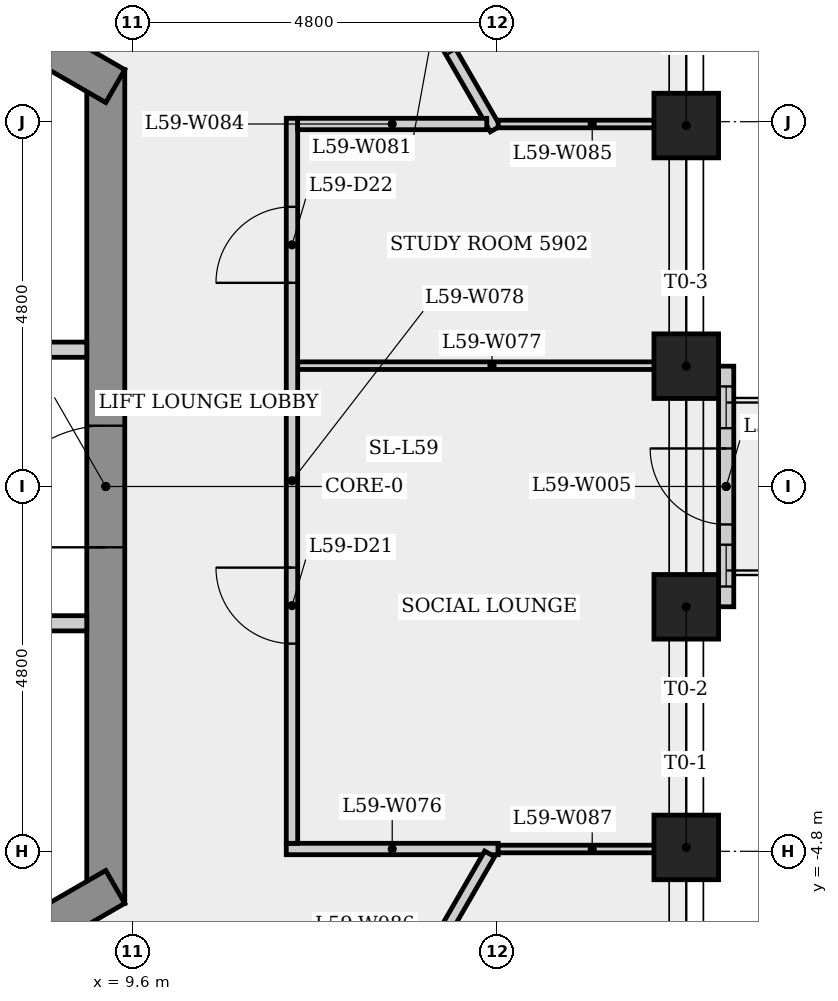
"""IFC4 building model, lengths in metres.
Left out: names, types, materials, properties, quantities, classifications, styles, units other than length and angle.
Written with IfcOpenShell. Run it as: python <this file> out.ifc"""

import sys

from ifc_helpers import new_model, si_unit, direction, frame, frame_2d, origin, origin_2d, place, context, subcontext, project, spatial, rectangle, extrude, element, fill, save


model = new_model("IFC4")
c1 = context("Model", 3, precision=1e-05, world=origin(), true_north=direction((0.0, 1.0)))
c2 = subcontext(c1, "Body", "Model", "MODEL_VIEW")
j1 = project(units=[si_unit("LENGTHUNIT", "METRE"), si_unit("PLANEANGLEUNIT", "RADIAN")], contexts=[c1])
p1 = place(None, origin())
s1 = spatial("IfcSite", under=j1, at=p1, CompositionType="ELEMENT")
p2 = place(p1, origin())
s2 = spatial("IfcBuilding", under=s1, at=p2, CompositionType="ELEMENT")
p3 = place(p2, frame((0.0, 0.0, 222.3)))
s3 = spatial("IfcBuildingStorey", under=s2, at=p3, CompositionType="ELEMENT", Elevation=222.3)
p4 = place(p3, frame((9.25, -5.485, 0.0), z_axis=(0.0, 0.0, 1.0), x_axis=(0.0, 1.0, 0.0)))
e1 = element("IfcWall", 1, at=p4, inside=s3, PredefinedType="SHEAR", context=c2, shape_type="SweptSolid", body=[
    extrude(rectangle(XDim=10.97, YDim=0.5, at=frame_2d((5.485, 0.0))), origin(), (0.0, 0.0, 1.0), 3.4),
])
p5 = place(p4, frame((4.685, 0.0, 0.0)))
e2 = element("IfcOpeningElement", 2, at=p5, cuts=e1, PredefinedType="OPENING", context=c2, shape_type="SweptSolid", body=[
    extrude(rectangle(XDim=1.6, YDim=2.1, at=frame_2d((0.8, 1.05))), frame((0.0, 0.26, 0.0), z_axis=(0.0, -1.0, 0.0), x_axis=(1.0, 0.0, 0.0)), (0.0, 0.0, 1.0), 0.52),
])
p6 = place(p3, frame((9.375, 5.268, 0.0), z_axis=(0.0, 0.0, 1.0), x_axis=(-0.866023993627, 0.500002442456, 0.0)))
e3 = element("IfcWall", 3, at=p6, inside=s3, PredefinedType="SHEAR", context=c2, shape_type="SweptSolid", body=[
    extrude(rectangle(XDim=10.97, YDim=0.5, at=frame_2d((5.485, 0.0))), origin(), (0.0, 0.0, 1.0), 3.4),
])
p7 = place(p6, frame((5.382, 0.0, 0.0)))
e4 = element("IfcOpeningElement", 4, at=p7, cuts=e3, PredefinedType="OPENING", context=c2, shape_type="SweptSolid", body=[
    extrude(rectangle(XDim=0.9, YDim=2.1, at=frame_2d((0.45, 1.05))), frame((0.0, 0.26, 0.0), z_axis=(0.0, -1.0, 0.0), x_axis=(1.0, 0.0, 0.0)), (0.0, 0.0, 1.0), 0.52),
])
p8 = place(p3, frame((-0.125, -10.753, 0.0), z_axis=(0.0, 0.0, 1.0), x_axis=(0.866023993627, 0.500002442456, 0.0)))
e5 = element("IfcWall", 5, at=p8, inside=s3, PredefinedType="SHEAR", context=c2, shape_type="SweptSolid", body=[
    extrude(rectangle(XDim=10.97, YDim=0.5, at=frame_2d((5.485, 0.0))), origin(), (0.0, 0.0, 1.0), 3.4),
])
p9 = place(p8, frame((7.195, 0.0, 0.0)))
e6 = element("IfcOpeningElement", 6, at=p9, cuts=e5, PredefinedType="OPENING", context=c2, shape_type="SweptSolid", body=[
    extrude(rectangle(XDim=0.9, YDim=2.1, at=frame_2d((0.45, 1.05))), frame((0.0, 0.26, 0.0), z_axis=(0.0, -1.0, 0.0), x_axis=(1.0, 0.0, 0.0)), (0.0, 0.0, 1.0), 0.52),
])
for number, where, z_axis, x_axis in (
    (7, (16.887, -4.749, 0.0), (0.0, 0.0, 1.0), (1.0, 0.0, 0.0)),
    (8, (16.887, -1.583, 0.0), (0.0, 0.0, 1.0), (1.0, 0.0, 0.0)),
    (9, (16.887, 1.583, 0.0), (0.0, 0.0, 1.0), (1.0, 0.0, 0.0)),
    (10, (16.887, 4.749, 0.0), (0.0, 0.0, 1.0), (1.0, 0.0, 0.0)),
):
    element("IfcColumn", number, at=place(p3, frame(where, z_axis=z_axis, x_axis=x_axis)), inside=s3, PredefinedType="COLUMN", context=c2, shape_type="SweptSolid", body=[
        extrude(rectangle(XDim=0.85, YDim=0.85, at=origin_2d()), origin(), (0.0, 0.0, 1.0), 3.4),
    ])
p10 = place(p3, frame((17.413, -1.583, 0.0), z_axis=(0.0, 0.0, 1.0), x_axis=(0.0, 1.0, 0.0)))
e11 = element("IfcWall", 11, at=p10, inside=s3, PredefinedType="SOLIDWALL", context=c2, shape_type="SweptSolid", body=[
    extrude(rectangle(XDim=3.166, YDim=0.2, at=frame_2d((1.583, 0.0))), origin(), (0.0, 0.0, 1.0), 3.4),
])
p11 = place(p10, frame((1.083, 0.0, 0.0)))
e12 = element("IfcOpeningElement", 12, at=p11, cuts=e11, PredefinedType="OPENING", context=c2, shape_type="SweptSolid", body=[
    extrude(rectangle(XDim=1.0, YDim=2.4, at=frame_2d((0.5, 1.2))), frame((0.0, 0.11, 0.0), z_axis=(0.0, -1.0, 0.0), x_axis=(1.0, 0.0, 0.0)), (0.0, 0.0, 1.0), 0.22),
])
p12 = place(p10, frame((0.267, 0.0, 0.9)))
e13 = element("IfcOpeningElement", 13, at=p12, cuts=e11, PredefinedType="OPENING", context=c2, shape_type="SweptSolid", body=[
    extrude(rectangle(XDim=0.55, YDim=1.5, at=frame_2d((0.275, 0.75))), frame((0.0, 0.11, 0.0), z_axis=(0.0, -1.0, 0.0), x_axis=(1.0, 0.0, 0.0)), (0.0, 0.0, 1.0), 0.22),
])
p13 = place(p10, frame((2.35, 0.0, 0.9)))
e14 = element("IfcOpeningElement", 14, at=p13, cuts=e11, PredefinedType="OPENING", context=c2, shape_type="SweptSolid", body=[
    extrude(rectangle(XDim=0.55, YDim=1.5, at=frame_2d((0.275, 0.75))), frame((0.0, 0.11, 0.0), z_axis=(0.0, -1.0, 0.0), x_axis=(1.0, 0.0, 0.0)), (0.0, 0.0, 1.0), 0.22),
])
for number, where, z_axis, x_axis in (
    (15, (7.475, 1.8, 0.0), (0.0, 0.0, 1.0), (1.0, 0.0, 0.0)),
    (16, (9.0, -1.8, 0.0), (0.0, 0.0, 1.0), (-1.0, 0.0, 0.0)),
):
    element("IfcWall", number, at=place(p3, frame(where, z_axis=z_axis, x_axis=x_axis)), inside=s3, PredefinedType="PARTITIONING", context=c2, shape_type="SweptSolid", body=[
        extrude(rectangle(XDim=1.525, YDim=0.2, at=frame_2d((0.763, 0.0))), origin(), (0.0, 0.0, 1.0), 3.05),
    ])
p14 = place(p3, frame((11.625, -4.77, 0.0), z_axis=(0.0, 0.0, 1.0), x_axis=(1.0, 0.0, 0.0)))
e17 = element("IfcWall", 17, at=p14, inside=s3, PredefinedType="PARTITIONING", context=c2, shape_type="SweptSolid", body=[
    extrude(rectangle(XDim=2.788, YDim=0.15, at=frame_2d((1.394, 0.0))), origin(), (0.0, 0.0, 1.0), 3.05),
])
p15 = place(p3, frame((11.775, 1.59, 0.0), z_axis=(0.0, 0.0, 1.0), x_axis=(1.0, 0.0, 0.0)))
e18 = element("IfcWall", 18, at=p15, inside=s3, PredefinedType="PARTITIONING", context=c2, shape_type="SweptSolid", body=[
    extrude(rectangle(XDim=5.113, YDim=0.1, at=frame_2d((2.556, 0.0))), origin(), (0.0, 0.0, 1.0), 3.05),
])
p16 = place(p3, frame((11.7, -4.695, 0.0), z_axis=(0.0, 0.0, 1.0), x_axis=(0.0, 1.0, 0.0)))
e19 = element("IfcWall", 19, at=p16, inside=s3, PredefinedType="PARTITIONING", context=c2, shape_type="SweptSolid", body=[
    extrude(rectangle(XDim=9.539, YDim=0.15, at=frame_2d((4.77, 0.0))), origin(), (0.0, 0.0, 1.0), 3.05),
])
p17 = place(p16, frame((2.627, 0.0, 0.0)))
e20 = element("IfcOpeningElement", 20, at=p17, cuts=e19, PredefinedType="OPENING", context=c2, shape_type="SweptSolid", body=[
    extrude(rectangle(XDim=1.0, YDim=2.1, at=frame_2d((0.5, 1.05))), frame((0.0, 0.085, 0.0), z_axis=(0.0, -1.0, 0.0), x_axis=(1.0, 0.0, 0.0)), (0.0, 0.0, 1.0), 0.17),
])
p18 = place(p16, frame((7.375, 0.0, 0.0)))
e21 = element("IfcOpeningElement", 21, at=p18, cuts=e19, PredefinedType="OPENING", context=c2, shape_type="SweptSolid", body=[
    extrude(rectangle(XDim=1.0, YDim=2.1, at=frame_2d((0.5, 1.05))), frame((0.0, 0.085, 0.0), z_axis=(0.0, -1.0, 0.0), x_axis=(1.0, 0.0, 0.0)), (0.0, 0.0, 1.0), 0.17),
])
p19 = place(p3, frame((12.765, 7.493, 0.0), z_axis=(0.0, 0.0, 1.0), x_axis=(0.499995898912, -0.866027771536, 0.0)))
e22 = element("IfcWall", 22, at=p19, inside=s3, PredefinedType="PARTITIONING", context=c2, shape_type="SweptSolid", body=[
    extrude(rectangle(XDim=3.22, YDim=0.15, at=frame_2d((1.61, 0.0))), origin(), (0.0, 0.0, 1.0), 3.05),
])
p20 = place(p19, frame((1.055, 0.0, 0.0)))
e23 = element("IfcOpeningElement", 23, at=p20, cuts=e22, PredefinedType="OPENING", context=c2, shape_type="SweptSolid", body=[
    extrude(rectangle(XDim=1.0, YDim=2.1, at=frame_2d((0.5, 1.05))), frame((0.0, 0.085, 0.0), z_axis=(0.0, -1.0, 0.0), x_axis=(1.0, 0.0, 0.0)), (0.0, 0.0, 1.0), 0.17),
])
p21 = place(p3, frame((14.263, 4.77, 0.0), z_axis=(0.0, 0.0, 1.0), x_axis=(-1.0, 0.0, 0.0)))
e24 = element("IfcWall", 24, at=p21, inside=s3, PredefinedType="PARTITIONING", context=c2, shape_type="SweptSolid", body=[
    extrude(rectangle(XDim=2.488, YDim=0.15, at=frame_2d((1.244, 0.0))), origin(), (0.0, 0.0, 1.0), 3.05),
])
p22 = place(p3, frame((14.413, 4.77, 0.0), z_axis=(0.0, 0.0, 1.0), x_axis=(1.0, 0.0, 0.0)))
e25 = element("IfcWall", 25, at=p22, inside=s3, PredefinedType="PARTITIONING", context=c2, shape_type="SweptSolid", body=[
    extrude(rectangle(XDim=2.475, YDim=0.1, at=frame_2d((1.237, 0.0))), origin(), (0.0, 0.0, 1.0), 3.05),
])
p23 = place(p3, frame((14.3, -4.835, 0.0), z_axis=(0.0, 0.0, 1.0), x_axis=(-0.500038206906, -0.866003343893, 0.0)))
e26 = element("IfcWall", 26, at=p23, inside=s3, PredefinedType="PARTITIONING", context=c2, shape_type="SweptSolid", body=[
    extrude(rectangle(XDim=6.559, YDim=0.15, at=frame_2d((3.28, 0.0))), origin(), (0.0, 0.0, 1.0), 3.05),
])
p24 = place(p23, frame((2.78, 0.0, 0.0)))
e27 = element("IfcOpeningElement", 27, at=p24, cuts=e26, PredefinedType="OPENING", context=c2, shape_type="SweptSolid", body=[
    extrude(rectangle(XDim=1.0, YDim=2.1, at=frame_2d((0.5, 1.05))), frame((0.0, 0.085, 0.0), z_axis=(0.0, -1.0, 0.0), x_axis=(1.0, 0.0, 0.0)), (0.0, 0.0, 1.0), 0.17),
])
p25 = place(p3, frame((16.887, -4.77, 0.0), z_axis=(0.0, 0.0, 1.0), x_axis=(-1.0, 0.0, 0.0)))
e28 = element("IfcWall", 28, at=p25, inside=s3, PredefinedType="PARTITIONING", context=c2, shape_type="SweptSolid", body=[
    extrude(rectangle(XDim=2.475, YDim=0.1, at=frame_2d((1.237, 0.0))), origin(), (0.0, 0.0, 1.0), 3.05),
])
p26 = place(p11, origin())
e29 = element("IfcDoor", 29, at=p26, inside=s3, OperationType="SINGLE_SWING_RIGHT", PredefinedType="DOOR", context=c2, shape_type="SweptSolid", body=[
    extrude(rectangle(XDim=1.0, YDim=2.4, at=frame_2d((0.5, 1.2))), frame((0.0, 0.025, 0.0), z_axis=(0.0, -1.0, 0.0), x_axis=(1.0, 0.0, 0.0)), (0.0, 0.0, 1.0), 0.05),
])
fill(e12, e29)
p27 = place(p12, origin())
e30 = element("IfcWindow", 30, at=p27, inside=s3, PartitioningType="SINGLE_PANEL", PredefinedType="WINDOW", context=c2, shape_type="SweptSolid", body=[
    extrude(rectangle(XDim=0.55, YDim=1.5, at=frame_2d((0.275, 0.75))), frame((0.0, 0.03, 0.0), z_axis=(0.0, -1.0, 0.0), x_axis=(1.0, 0.0, 0.0)), (0.0, 0.0, 1.0), 0.06),
])
fill(e13, e30)
p28 = place(p13, origin())
e31 = element("IfcWindow", 31, at=p28, inside=s3, PartitioningType="SINGLE_PANEL", PredefinedType="WINDOW", context=c2, shape_type="SweptSolid", body=[
    extrude(rectangle(XDim=0.55, YDim=1.5, at=frame_2d((0.275, 0.75))), frame((0.0, 0.03, 0.0), z_axis=(0.0, -1.0, 0.0), x_axis=(1.0, 0.0, 0.0)), (0.0, 0.0, 1.0), 0.06),
])
fill(e14, e31)
p29 = place(p17, origin())
e32 = element("IfcDoor", 32, at=p29, inside=s3, OperationType="SINGLE_SWING_RIGHT", PredefinedType="DOOR", context=c2, shape_type="SweptSolid", body=[
    extrude(rectangle(XDim=1.0, YDim=2.1, at=frame_2d((0.5, 1.05))), frame((0.0, 0.025, 0.0), z_axis=(0.0, -1.0, 0.0), x_axis=(1.0, 0.0, 0.0)), (0.0, 0.0, 1.0), 0.05),
])
fill(e20, e32)
p30 = place(p18, origin())
e33 = element("IfcDoor", 33, at=p30, inside=s3, OperationType="SINGLE_SWING_LEFT", PredefinedType="DOOR", context=c2, shape_type="SweptSolid", body=[
    extrude(rectangle(XDim=1.0, YDim=2.1, at=frame_2d((0.5, 1.05))), frame((0.0, 0.025, 0.0), z_axis=(0.0, -1.0, 0.0), x_axis=(1.0, 0.0, 0.0)), (0.0, 0.0, 1.0), 0.05),
])
fill(e21, e33)
p31 = place(p20, origin())
e34 = element("IfcDoor", 34, at=p31, inside=s3, OperationType="SINGLE_SWING_RIGHT", PredefinedType="DOOR", context=c2, shape_type="SweptSolid", body=[
    extrude(rectangle(XDim=1.0, YDim=2.1, at=frame_2d((0.5, 1.05))), frame((0.0, 0.025, 0.0), z_axis=(0.0, -1.0, 0.0), x_axis=(1.0, 0.0, 0.0)), (0.0, 0.0, 1.0), 0.05),
])
fill(e23, e34)
p32 = place(p5, origin())
e35 = element("IfcDoor", 35, at=p32, inside=s3, OperationType="SINGLE_SWING_LEFT", PredefinedType="DOOR", context=c2, shape_type="SweptSolid", body=[
    extrude(rectangle(XDim=1.6, YDim=2.1, at=frame_2d((0.8, 1.05))), frame((0.0, 0.025, 0.0), z_axis=(0.0, -1.0, 0.0), x_axis=(1.0, 0.0, 0.0)), (0.0, 0.0, 1.0), 0.05),
])
fill(e2, e35)
save(model, sys.argv[1])
